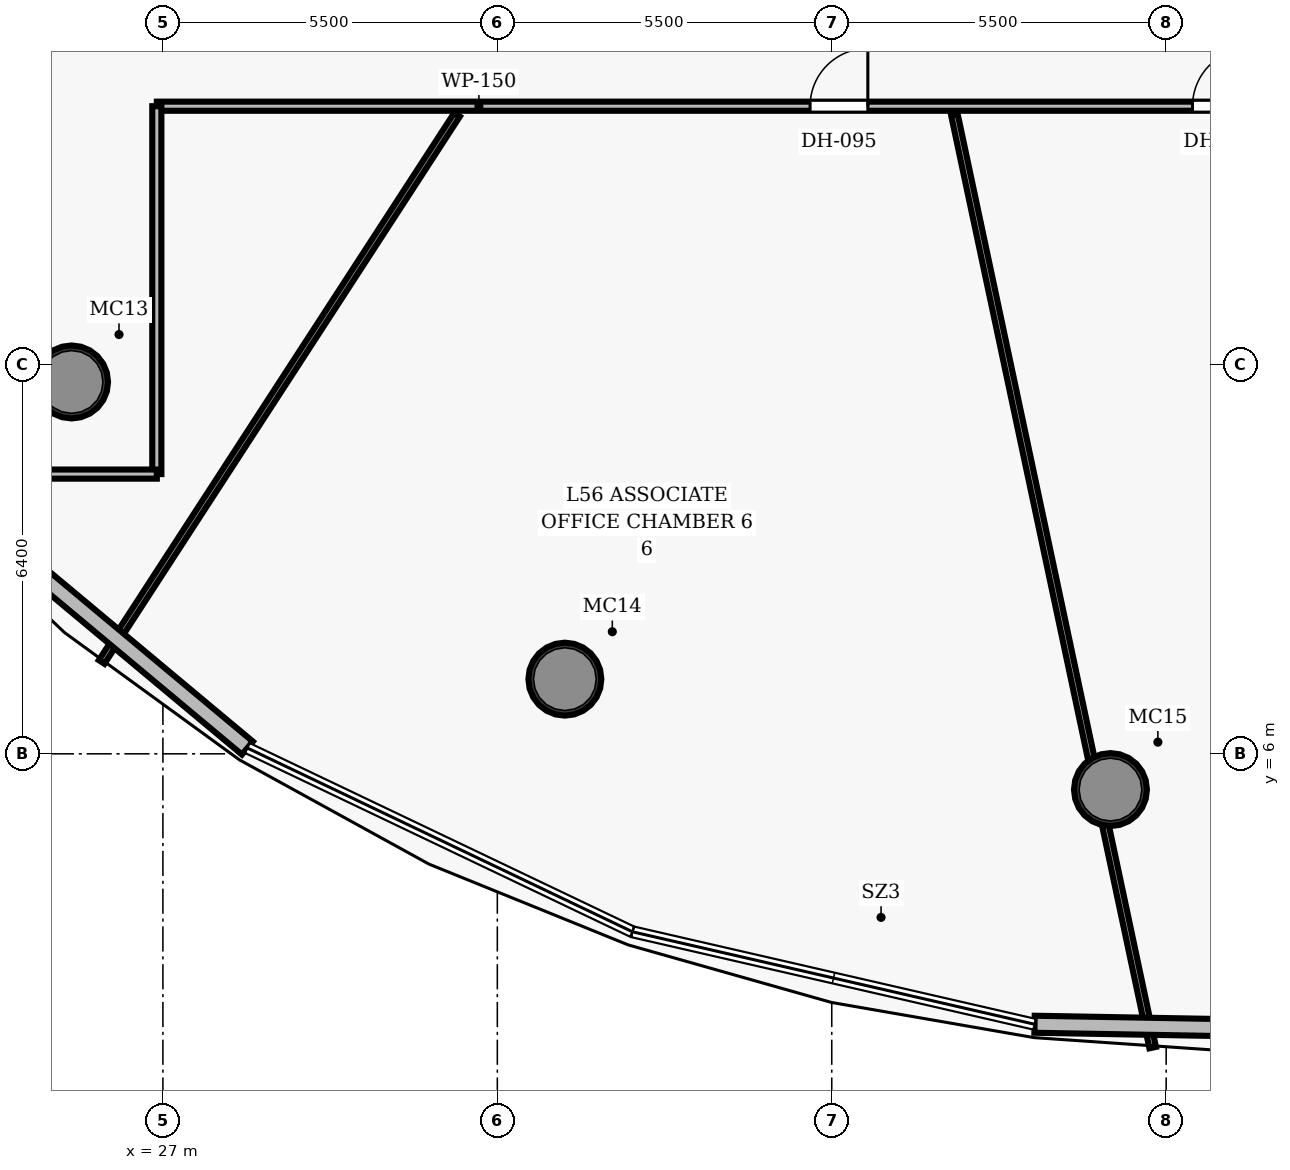
"""IFC4 building model, lengths in metres.
Left out: names, types, materials, properties, quantities, classifications, styles, units other than length and angle.
Written with IfcOpenShell. Run it as: python <this file> out.ifc"""

import sys

from ifc_helpers import new_model, si_unit, direction, frame, frame_2d, origin, origin_2d, place, context, subcontext, project, spatial, rectangle, hollow_circle, extrude, element, fill, save


model = new_model("IFC4")
c1 = context("Model", 3, precision=1e-05, world=origin(), true_north=direction((0.0, 1.0)))
c2 = subcontext(c1, "Body", "Model", "MODEL_VIEW")
j1 = project(units=[si_unit("LENGTHUNIT", "METRE"), si_unit("PLANEANGLEUNIT", "RADIAN")], contexts=[c1])
p1 = place(None, origin())
s1 = spatial("IfcSite", under=j1, at=p1, CompositionType="ELEMENT")
p2 = place(p1, origin())
s2 = spatial("IfcBuilding", under=s1, at=p2, CompositionType="ELEMENT")
p3 = place(p2, frame((0.0, 0.0, 221.25)))
s3 = spatial("IfcBuildingStorey", under=s2, at=p3, CompositionType="ELEMENT", Elevation=221.25)
for number, where, z_axis, x_axis in (
    (1, (25.498, 12.115, 0.0), (0.0, 0.0, 1.0), (1.0, 0.0, 0.0)),
    (2, (33.611, 7.228, 0.0), (0.0, 0.0, 1.0), (1.0, 0.0, 0.0)),
    (3, (42.584, 5.412, 0.0), (0.0, 0.0, 1.0), (1.0, 0.0, 0.0)),
):
    element("IfcColumn", number, at=place(p3, frame(where, z_axis=z_axis, x_axis=x_axis)), inside=s3, PredefinedType="COLUMN", context=c2, shape_type="SweptSolid", body=[
        extrude(hollow_circle(Radius=0.6, WallThickness=0.05, at=origin_2d()), origin(), (0.0, 0.0, 1.0), 3.85),
    ])
p4 = place(p3, frame((26.9, 16.65, 0.0), z_axis=(0.0, 0.0, 1.0), x_axis=(1.0, 0.0, 0.0)))
e4 = element("IfcWall", 4, at=p4, inside=s3, PredefinedType="PARTITIONING", context=c2, shape_type="SweptSolid", body=[
    extrude(rectangle(XDim=22.2, YDim=0.15, at=frame_2d((11.1, 0.0))), origin(), (0.0, 0.0, 1.0), 3.035),
])
p5 = place(p4, frame((10.744, 0.0, 0.0)))
e5 = element("IfcOpeningElement", 5, at=p5, cuts=e4, PredefinedType="OPENING", context=c2, shape_type="SweptSolid", body=[
    extrude(rectangle(XDim=0.95, YDim=2.15, at=frame_2d((0.475, 1.075))), frame((0.0, 0.085, 0.0), z_axis=(0.0, -1.0, 0.0), x_axis=(1.0, 0.0, 0.0)), (0.0, 0.0, 1.0), 0.17),
])
p6 = place(p4, frame((17.033, 0.0, 0.0)))
e6 = element("IfcOpeningElement", 6, at=p6, cuts=e4, PredefinedType="OPENING", context=c2, shape_type="SweptSolid", body=[
    extrude(rectangle(XDim=0.95, YDim=2.15, at=frame_2d((0.475, 1.075))), frame((0.0, 0.085, 0.0), z_axis=(0.0, -1.0, 0.0), x_axis=(1.0, 0.0, 0.0)), (0.0, 0.0, 1.0), 0.17),
])
p7 = place(p3, frame((26.9, 10.6, 0.0), z_axis=(0.0, 0.0, 1.0), x_axis=(0.0, 1.0, 0.0)))
e7 = element("IfcWall", 7, at=p7, inside=s3, PredefinedType="PARTITIONING", context=c2, shape_type="SweptSolid", body=[
    extrude(rectangle(XDim=6.05, YDim=0.15, at=frame_2d((3.025, 0.0))), origin(), (0.0, 0.0, 1.0), 3.035),
])
p8 = place(p3, frame((24.8, 10.6, 0.0), z_axis=(0.0, 0.0, 1.0), x_axis=(1.0, 0.0, 0.0)))
e8 = element("IfcWall", 8, at=p8, inside=s3, PredefinedType="PARTITIONING", context=c2, shape_type="SweptSolid", body=[
    extrude(rectangle(XDim=2.1, YDim=0.15, at=frame_2d((1.05, 0.0))), origin(), (0.0, 0.0, 1.0), 3.035),
])
p9 = place(p3, frame((31.837, 16.51, 0.0), z_axis=(0.0, 0.0, 1.0), x_axis=(-0.544642851203, -0.838668089672, 0.0)))
e9 = element("IfcWall", 9, at=p9, inside=s3, PredefinedType="PARTITIONING", context=c2, shape_type="SweptSolid", body=[
    extrude(rectangle(XDim=10.731, YDim=0.11, at=frame_2d((5.366, 0.0))), origin(), (0.0, 0.0, 1.0), 3.035),
])
p10 = place(p3, frame((40.017, 16.51, 0.0), z_axis=(0.0, 0.0, 1.0), x_axis=(0.207914047214, -0.978147099863, 0.0)))
e10 = element("IfcWall", 10, at=p10, inside=s3, PredefinedType="PARTITIONING", context=c2, shape_type="SweptSolid", body=[
    extrude(rectangle(XDim=15.684, YDim=0.11, at=frame_2d((7.842, 0.0))), origin(), (0.0, 0.0, 1.0), 3.035),
])
p11 = place(p3, frame((28.39, 6.095, 0.0), z_axis=(0.0, 0.0, 1.0), x_axis=(-0.767669978916, 0.640845381876, 0.0)))
e11 = element("IfcWall", 11, at=p11, inside=s3, PredefinedType="SOLIDWALL", context=c2, shape_type="SweptSolid", body=[
    extrude(rectangle(XDim=7.046, YDim=0.28, at=frame_2d((3.523, 0.0))), origin(), (0.0, 0.0, 1.0), 3.62),
])
p12 = place(p3, frame((47.561, 1.442, 0.0), z_axis=(0.0, 0.0, 1.0), x_axis=(-0.999841547857, 0.017801100499, 0.0)))
e12 = element("IfcWall", 12, at=p12, inside=s3, PredefinedType="SOLIDWALL", context=c2, shape_type="SweptSolid", body=[
    extrude(rectangle(XDim=6.227, YDim=0.28, at=frame_2d((3.113, 0.0))), origin(), (0.0, 0.0, 1.0), 3.62),
])
p13 = place(p5, origin())
e13 = element("IfcDoor", 13, at=p13, inside=s3, OperationType="SINGLE_SWING_RIGHT", PredefinedType="DOOR", context=c2, shape_type="SweptSolid", body=[
    extrude(rectangle(XDim=0.95, YDim=2.15, at=frame_2d((0.475, 1.075))), frame((0.0, 0.025, 0.0), z_axis=(0.0, -1.0, 0.0), x_axis=(1.0, 0.0, 0.0)), (0.0, 0.0, 1.0), 0.05),
])
fill(e5, e13)
p14 = place(p6, origin())
e14 = element("IfcDoor", 14, at=p14, inside=s3, OperationType="SINGLE_SWING_RIGHT", PredefinedType="DOOR", context=c2, shape_type="SweptSolid", body=[
    extrude(rectangle(XDim=0.95, YDim=2.15, at=frame_2d((0.475, 1.075))), frame((0.0, 0.025, 0.0), z_axis=(0.0, -1.0, 0.0), x_axis=(1.0, 0.0, 0.0)), (0.0, 0.0, 1.0), 0.05),
])
fill(e6, e14)
save(model, sys.argv[1])
